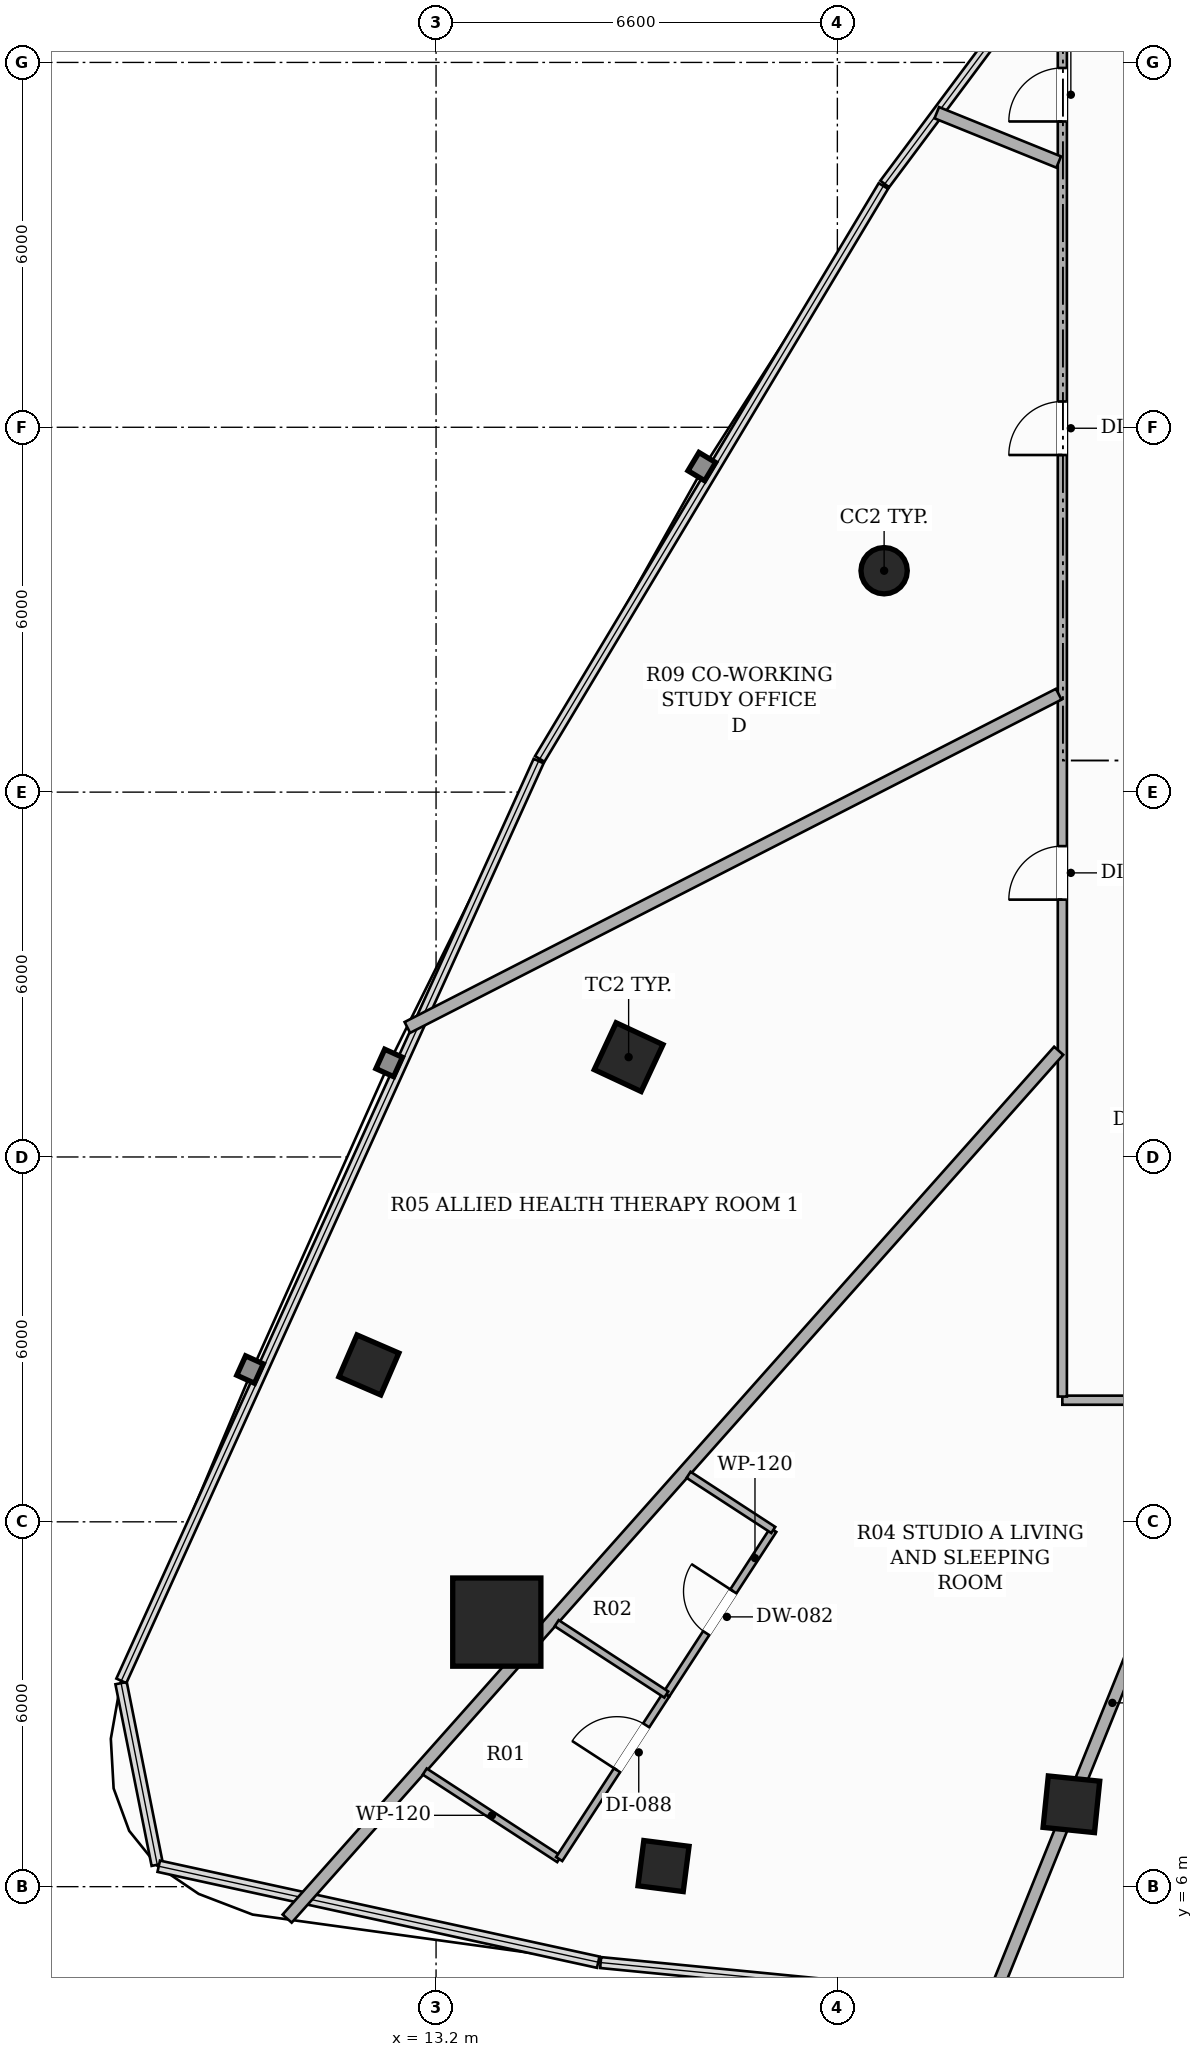
"""IFC4 building model, lengths in metres.
Left out: names, types, materials, properties, quantities, classifications, styles, units other than length and angle.
Written with IfcOpenShell. Run it as: python <this file> out.ifc"""

import sys

from ifc_helpers import new_model, si_unit, direction, frame, frame_2d, origin, origin_2d, place, context, subcontext, project, spatial, rectangle, hollow_rectangle, hollow_circle, extrude, element, fill, save


model = new_model("IFC4")
c1 = context("Model", 3, precision=1e-05, world=origin(), true_north=direction((0.0, 1.0)))
c2 = subcontext(c1, "Body", "Model", "MODEL_VIEW")
j1 = project(units=[si_unit("LENGTHUNIT", "METRE"), si_unit("PLANEANGLEUNIT", "RADIAN")], contexts=[c1])
p1 = place(None, origin())
s1 = spatial("IfcSite", under=j1, at=p1, CompositionType="ELEMENT")
p2 = place(p1, origin())
s2 = spatial("IfcBuilding", under=s1, at=p2, CompositionType="ELEMENT")
p3 = place(p2, frame((0.0, 0.0, 157.25)))
s3 = spatial("IfcBuildingStorey", under=s2, at=p3, CompositionType="ELEMENT", Elevation=157.25)
p4 = place(p3, frame((14.199, 10.351, 0.0), z_axis=(0.0, 0.0, 1.0), x_axis=(1.0, 0.0, 0.0)))
e1 = element("IfcColumn", 1, at=p4, inside=s3, PredefinedType="COLUMN", context=c2, shape_type="SweptSolid", body=[
    extrude(hollow_rectangle(XDim=1.45, YDim=1.45, WallThickness=0.045, at=origin_2d()), origin(), (0.0, 0.0, 1.0), 3.3),
])
p5 = place(p3, frame((20.569, 27.641, 0.0), z_axis=(0.0, 0.0, 1.0), x_axis=(1.0, 0.0, 0.0)))
e2 = element("IfcColumn", 2, at=p5, inside=s3, PredefinedType="COLUMN", context=c2, shape_type="SweptSolid", body=[
    extrude(hollow_circle(Radius=0.381, WallThickness=0.022, at=origin_2d()), origin(), (0.0, 0.0, 1.0), 3.3),
])
for number, where, z_axis, x_axis in (
    (3, (16.367, 19.642, 0.0), (0.0, 0.0, 1.0), (0.423, 0.906, 0.0)),
    (4, (23.649, 7.355, 0.0), (0.0, 0.0, 1.0), (-0.995, 0.101, 0.0)),
):
    element("IfcColumn", number, at=place(p3, frame(where, z_axis=z_axis, x_axis=x_axis)), inside=s3, PredefinedType="COLUMN", context=c2, shape_type="SweptSolid", body=[
        extrude(hollow_rectangle(XDim=0.85, YDim=0.85, WallThickness=0.028, at=origin_2d()), origin(), (0.0, 0.0, 1.0), 3.3),
    ])
for number, where, z_axis, x_axis in (
    (5, (12.095, 14.58, 0.0), (0.0, 0.0, 1.0), (0.397, 0.918, 0.0)),
    (6, (16.941, 6.339, 0.0), (0.0, 0.0, 1.0), (-0.992, 0.127, 0.0)),
):
    element("IfcColumn", number, at=place(p3, frame(where, z_axis=z_axis, x_axis=x_axis)), inside=s3, PredefinedType="COLUMN", context=c2, shape_type="SweptSolid", body=[
        extrude(hollow_rectangle(XDim=0.75, YDim=0.75, WallThickness=0.025, at=origin_2d()), origin(), (0.0, 0.0, 1.0), 3.3),
    ])
p6 = place(p3, frame((26.09, 14.0, 0.0), z_axis=(0.0, 0.0, 1.0), x_axis=(-1.0, 0.0, 0.0)))
e7 = element("IfcWall", 7, at=p6, inside=s3, PredefinedType="PARTITIONING", context=c2, shape_type="SweptSolid", body=[
    extrude(rectangle(XDim=2.59, YDim=0.15, at=frame_2d((1.295, 0.0))), origin(), (0.0, 0.0, 1.0), 2.721),
])
p7 = place(p3, frame((23.5, 14.06, 0.0), z_axis=(0.0, 0.0, 1.0), x_axis=(0.0, 1.0, 0.0)))
e8 = element("IfcWall", 8, at=p7, inside=s3, PredefinedType="PARTITIONING", context=c2, shape_type="SweptSolid", body=[
    extrude(rectangle(XDim=22.84, YDim=0.15, at=frame_2d((11.42, 0.0))), origin(), (0.0, 0.0, 1.0), 2.413),
])
p8 = place(p7, frame((8.172, 0.0, 0.0)))
e9 = element("IfcOpeningElement", 9, at=p8, cuts=e8, PredefinedType="OPENING", context=c2, shape_type="SweptSolid", body=[
    extrude(rectangle(XDim=0.88, YDim=2.1, at=frame_2d((0.44, 1.05))), frame((0.0, 0.085, 0.0), z_axis=(0.0, -1.0, 0.0), x_axis=(1.0, 0.0, 0.0)), (0.0, 0.0, 1.0), 0.17),
])
p9 = place(p7, frame((20.969, 0.0, 0.0)))
e10 = element("IfcOpeningElement", 10, at=p9, cuts=e8, PredefinedType="OPENING", context=c2, shape_type="SweptSolid", body=[
    extrude(rectangle(XDim=0.88, YDim=2.1, at=frame_2d((0.44, 1.05))), frame((0.0, 0.085, 0.0), z_axis=(0.0, -1.0, 0.0), x_axis=(1.0, 0.0, 0.0)), (0.0, 0.0, 1.0), 0.17),
])
p10 = place(p7, frame((15.484, 0.0, 0.0)))
e11 = element("IfcOpeningElement", 11, at=p10, cuts=e8, PredefinedType="OPENING", context=c2, shape_type="SweptSolid", body=[
    extrude(rectangle(XDim=0.88, YDim=2.1, at=frame_2d((0.44, 1.05))), frame((0.0, 0.085, 0.0), z_axis=(0.0, -1.0, 0.0), x_axis=(1.0, 0.0, 0.0)), (0.0, 0.0, 1.0), 0.17),
])
p11 = place(p3, frame((22.311, 4.045, 0.0), z_axis=(0.0, 0.0, 1.0), x_axis=(0.374673572515, 0.92715679044, 0.0)))
e12 = element("IfcWall", 12, at=p11, inside=s3, PredefinedType="PARTITIONING", context=c2, shape_type="SweptSolid", body=[
    extrude(rectangle(XDim=10.737, YDim=0.2, at=frame_2d((5.369, 0.0))), origin(), (0.0, 0.0, 1.0), 2.413),
])
p12 = place(p3, frame((23.44, 19.747, 0.0), z_axis=(0.0, 0.0, 1.0), x_axis=(-0.664444771995, -0.747337370248, 0.0)))
e13 = element("IfcWall", 13, at=p12, inside=s3, PredefinedType="PARTITIONING", context=c2, shape_type="SweptSolid", body=[
    extrude(rectangle(XDim=19.097, YDim=0.2, at=frame_2d((9.549, 0.0))), origin(), (0.0, 0.0, 1.0), 2.413),
])
p13 = place(p3, frame((12.728, 20.13, 0.0), z_axis=(0.0, 0.0, 1.0), x_axis=(0.890257920911, 0.455456731486, 0.0)))
e14 = element("IfcWall", 14, at=p13, inside=s3, PredefinedType="PARTITIONING", context=c2, shape_type="SweptSolid", body=[
    extrude(rectangle(XDim=12.032, YDim=0.2, at=frame_2d((6.016, 0.0))), origin(), (0.0, 0.0, 1.0), 2.413),
])
p14 = place(p3, frame((23.44, 34.362, 0.0), z_axis=(0.0, 0.0, 1.0), x_axis=(-0.927021575741, 0.375007997395, 0.0)))
e15 = element("IfcWall", 15, at=p14, inside=s3, PredefinedType="PARTITIONING", context=c2, shape_type="SweptSolid", body=[
    extrude(rectangle(XDim=2.163, YDim=0.2, at=frame_2d((1.081, 0.0))), origin(), (0.0, 0.0, 1.0), 3.06),
])
p15 = place(p3, frame((16.986, 9.16, 0.0), z_axis=(0.0, 0.0, 1.0), x_axis=(0.545222266406, 0.8382915246, 0.0)))
e16 = element("IfcWall", 16, at=p15, inside=s3, PredefinedType="PARTITIONING", context=c2, shape_type="SweptSolid", body=[
    extrude(rectangle(XDim=3.228, YDim=0.12, at=frame_2d((1.614, 0.0))), origin(), (0.0, 0.0, 1.0), 3.06),
])
p16 = place(p15, frame((1.204, 0.0, 0.0)))
e17 = element("IfcOpeningElement", 17, at=p16, cuts=e16, PredefinedType="OPENING", context=c2, shape_type="SweptSolid", body=[
    extrude(rectangle(XDim=0.82, YDim=2.1, at=frame_2d((0.41, 1.05))), frame((0.0, 0.07, 0.0), z_axis=(0.0, -1.0, 0.0), x_axis=(1.0, 0.0, 0.0)), (0.0, 0.0, 1.0), 0.14),
])
p17 = place(p3, frame((18.746, 11.866, 0.0), z_axis=(0.0, 0.0, 1.0), x_axis=(-0.838034005253, 0.545618003771, 0.0)))
e18 = element("IfcWall", 18, at=p17, inside=s3, PredefinedType="PARTITIONING", context=c2, shape_type="SweptSolid", body=[
    extrude(rectangle(XDim=1.662, YDim=0.12, at=frame_2d((0.831, 0.0))), origin(), (0.0, 0.0, 1.0), 3.06),
])
p18 = place(p3, frame((13.014, 7.893, 0.0), z_axis=(0.0, 0.0, 1.0), x_axis=(0.838149605573, -0.545440407999, 0.0)))
e19 = element("IfcWall", 19, at=p18, inside=s3, PredefinedType="PARTITIONING", context=c2, shape_type="SweptSolid", body=[
    extrude(rectangle(XDim=2.638, YDim=0.12, at=frame_2d((1.319, 0.0))), origin(), (0.0, 0.0, 1.0), 3.06),
])
p19 = place(p3, frame((15.225, 6.454, 0.0), z_axis=(0.0, 0.0, 1.0), x_axis=(0.54546937792, 0.838130752181, 0.0)))
e20 = element("IfcWall", 20, at=p19, inside=s3, PredefinedType="PARTITIONING", context=c2, shape_type="SweptSolid", body=[
    extrude(rectangle(XDim=3.228, YDim=0.12, at=frame_2d((1.614, 0.0))), origin(), (0.0, 0.0, 1.0), 2.413),
])
p20 = place(p19, frame((1.744, 0.0, 0.0)))
e21 = element("IfcOpeningElement", 21, at=p20, cuts=e20, PredefinedType="OPENING", context=c2, shape_type="SweptSolid", body=[
    extrude(rectangle(XDim=0.88, YDim=2.1, at=frame_2d((0.44, 1.05))), frame((0.0, 0.07, 0.0), z_axis=(0.0, -1.0, 0.0), x_axis=(1.0, 0.0, 0.0)), (0.0, 0.0, 1.0), 0.14),
])
p21 = place(p3, frame((16.986, 9.16, 0.0), z_axis=(0.0, 0.0, 1.0), x_axis=(-0.838062073647, 0.545574890106, 0.0)))
e22 = element("IfcWall", 22, at=p21, inside=s3, PredefinedType="PARTITIONING", context=c2, shape_type="SweptSolid", body=[
    extrude(rectangle(XDim=2.15, YDim=0.12, at=frame_2d((1.075, 0.0))), origin(), (0.0, 0.0, 1.0), 3.06),
])
p22 = place(p8, origin())
e23 = element("IfcDoor", 23, at=p22, inside=s3, OperationType="SINGLE_SWING_LEFT", PredefinedType="DOOR", context=c2, shape_type="SweptSolid", body=[
    extrude(rectangle(XDim=0.88, YDim=2.1, at=frame_2d((0.44, 1.05))), frame((0.0, 0.025, 0.0), z_axis=(0.0, -1.0, 0.0), x_axis=(1.0, 0.0, 0.0)), (0.0, 0.0, 1.0), 0.05),
])
fill(e9, e23)
p23 = place(p16, origin())
e24 = element("IfcDoor", 24, at=p23, inside=s3, OperationType="SINGLE_SWING_RIGHT", PredefinedType="DOOR", context=c2, shape_type="SweptSolid", body=[
    extrude(rectangle(XDim=0.82, YDim=2.1, at=frame_2d((0.41, 1.05))), frame((0.0, 0.025, 0.0), z_axis=(0.0, -1.0, 0.0), x_axis=(1.0, 0.0, 0.0)), (0.0, 0.0, 1.0), 0.05),
])
fill(e17, e24)
p24 = place(p20, origin())
e25 = element("IfcDoor", 25, at=p24, inside=s3, OperationType="SINGLE_SWING_LEFT", PredefinedType="DOOR", context=c2, shape_type="SweptSolid", body=[
    extrude(rectangle(XDim=0.88, YDim=2.1, at=frame_2d((0.44, 1.05))), frame((0.0, 0.025, 0.0), z_axis=(0.0, -1.0, 0.0), x_axis=(1.0, 0.0, 0.0)), (0.0, 0.0, 1.0), 0.05),
])
fill(e21, e25)
p25 = place(p9, origin())
e26 = element("IfcDoor", 26, at=p25, inside=s3, OperationType="SINGLE_SWING_LEFT", PredefinedType="DOOR", context=c2, shape_type="SweptSolid", body=[
    extrude(rectangle(XDim=0.88, YDim=2.1, at=frame_2d((0.44, 1.05))), frame((0.0, 0.025, 0.0), z_axis=(0.0, -1.0, 0.0), x_axis=(1.0, 0.0, 0.0)), (0.0, 0.0, 1.0), 0.05),
])
fill(e10, e26)
p26 = place(p10, origin())
e27 = element("IfcDoor", 27, at=p26, inside=s3, OperationType="SINGLE_SWING_LEFT", PredefinedType="DOOR", context=c2, shape_type="SweptSolid", body=[
    extrude(rectangle(XDim=0.88, YDim=2.1, at=frame_2d((0.44, 1.05))), frame((0.0, 0.025, 0.0), z_axis=(0.0, -1.0, 0.0), x_axis=(1.0, 0.0, 0.0)), (0.0, 0.0, 1.0), 0.05),
])
fill(e11, e27)
save(model, sys.argv[1])
